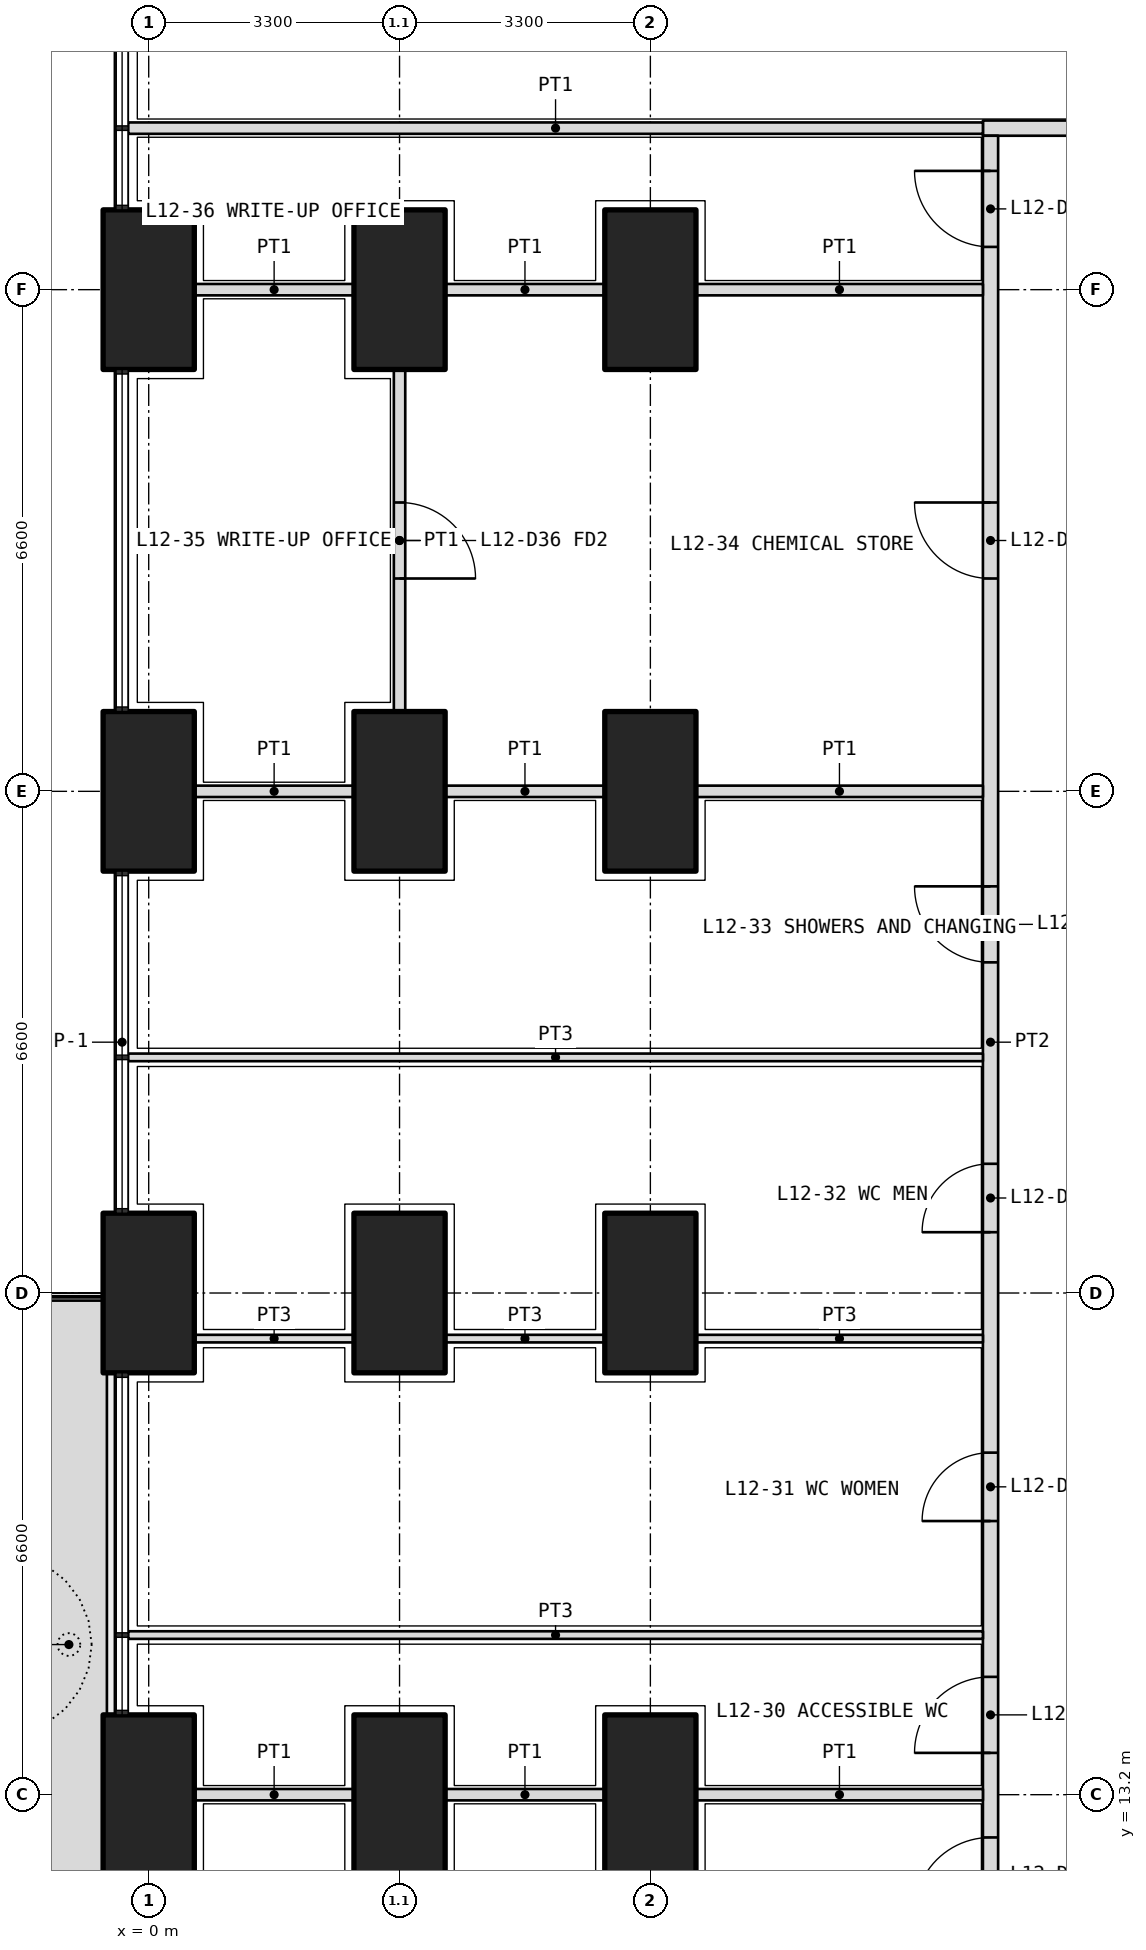
"""IFC4 building model, lengths in metres.
Left out: names, types, materials, properties, quantities, classifications, styles, units other than length and angle.
Written with IfcOpenShell. Run it as: python <this file> out.ifc"""

import sys

from ifc_helpers import new_model, si_unit, direction, frame, frame_2d, origin, origin_2d, place, context, subcontext, project, spatial, polyline, rectangle, outline, extrude, element, fill, save


model = new_model("IFC4")
c1 = context("Model", 3, precision=1e-05, world=origin(), true_north=direction((0.0, 1.0)))
c2 = subcontext(c1, "Body", "Model", "MODEL_VIEW")
j1 = project(units=[si_unit("LENGTHUNIT", "METRE"), si_unit("PLANEANGLEUNIT", "RADIAN")], contexts=[c1])
p1 = place(None, origin())
s1 = spatial("IfcSite", under=j1, at=p1, CompositionType="ELEMENT")
p2 = place(p1, origin())
s2 = spatial("IfcBuilding", under=s1, at=p2, CompositionType="ELEMENT")
p3 = place(p2, frame((0.0, 0.0, 54.9)))
s3 = spatial("IfcBuildingStorey", under=s2, at=p3, CompositionType="ELEMENT", Elevation=54.9)
for number, where, z_axis, x_axis in (
    (1, (0.0, 13.2, 0.0), (0.0, 0.0, 1.0), (0.0, 1.0, 0.0)),
    (2, (0.0, 19.8, 0.0), (0.0, 0.0, 1.0), (0.0, 1.0, 0.0)),
    (3, (0.0, 26.4, 0.0), (0.0, 0.0, 1.0), (0.0, 1.0, 0.0)),
    (4, (0.0, 33.0, 0.0), (0.0, 0.0, 1.0), (0.0, 1.0, 0.0)),
    (5, (3.3, 13.2, 0.0), (0.0, 0.0, 1.0), (0.0, 1.0, 0.0)),
    (6, (3.3, 19.8, 0.0), (0.0, 0.0, 1.0), (0.0, 1.0, 0.0)),
    (7, (3.3, 26.4, 0.0), (0.0, 0.0, 1.0), (0.0, 1.0, 0.0)),
    (8, (3.3, 33.0, 0.0), (0.0, 0.0, 1.0), (0.0, 1.0, 0.0)),
    (9, (6.6, 13.2, 0.0), (0.0, 0.0, 1.0), (0.0, 1.0, 0.0)),
    (10, (6.6, 19.8, 0.0), (0.0, 0.0, 1.0), (0.0, 1.0, 0.0)),
    (11, (6.6, 26.4, 0.0), (0.0, 0.0, 1.0), (0.0, 1.0, 0.0)),
    (12, (6.6, 33.0, 0.0), (0.0, 0.0, 1.0), (0.0, 1.0, 0.0)),
):
    element("IfcColumn", number, at=place(p3, frame(where, z_axis=z_axis, x_axis=x_axis)), inside=s3, PredefinedType="COLUMN", context=c2, shape_type="SweptSolid", body=[
        extrude(rectangle(XDim=2.1, YDim=1.2, at=origin_2d()), origin(), (0.0, 0.0, 1.0), 4.2),
    ])
p4 = place(p3, origin())
e13 = element("IfcWall", 13, at=p4, inside=s3, PredefinedType="USERDEFINED", context=c2, shape_type="SweptSolid", body=[
    extrude(outline(polyline([(-1.55, 10.65), (-0.55, 10.65), (-0.55, 19.7), (-1.55, 19.7), (-1.55, 10.65)]), holes=[polyline([(-1.4, 10.8), (-0.7, 10.8), (-0.7, 19.55), (-1.4, 19.55), (-1.4, 10.8)])]), origin(), (0.0, 0.0, 1.0), 1.05),
])
p5 = place(p3, frame((10.975, 35.125, 0.0), z_axis=(0.0, 0.0, 1.0), x_axis=(1.0, 0.0, 0.0)))
e14 = element("IfcWall", 14, at=p5, inside=s3, PredefinedType="PARTITIONING", context=c2, shape_type="SweptSolid", body=[
    extrude(rectangle(XDim=30.85, YDim=0.2, at=frame_2d((15.425, 0.0))), origin(), (0.0, 0.0, 1.0), 2.85),
])
p6 = place(p5, frame((2.312, 0.0, 0.0)))
e15 = element("IfcOpeningElement", 15, at=p6, cuts=e14, PredefinedType="OPENING", context=c2, shape_type="SweptSolid", body=[
    extrude(rectangle(XDim=1.0, YDim=2.1, at=frame_2d((0.5, 1.05))), frame((0.0, 0.11, 0.0), z_axis=(0.0, -1.0, 0.0), x_axis=(1.0, 0.0, 0.0)), (0.0, 0.0, 1.0), 0.22),
])
p7 = place(p5, frame((11.625, 0.0, 0.0)))
e16 = element("IfcOpeningElement", 16, at=p7, cuts=e14, PredefinedType="OPENING", context=c2, shape_type="SweptSolid", body=[
    extrude(rectangle(XDim=1.0, YDim=2.1, at=frame_2d((0.5, 1.05))), frame((0.0, 0.11, 0.0), z_axis=(0.0, -1.0, 0.0), x_axis=(1.0, 0.0, 0.0)), (0.0, 0.0, 1.0), 0.22),
])
p8 = place(p5, frame((21.525, 0.0, 0.0)))
e17 = element("IfcOpeningElement", 17, at=p8, cuts=e14, PredefinedType="OPENING", context=c2, shape_type="SweptSolid", body=[
    extrude(rectangle(XDim=1.0, YDim=2.1, at=frame_2d((0.5, 1.05))), frame((0.0, 0.11, 0.0), z_axis=(0.0, -1.0, 0.0), x_axis=(1.0, 0.0, 0.0)), (0.0, 0.0, 1.0), 0.22),
])
p9 = place(p5, frame((26.475, 0.0, 0.0)))
e18 = element("IfcOpeningElement", 18, at=p9, cuts=e14, PredefinedType="OPENING", context=c2, shape_type="SweptSolid", body=[
    extrude(rectangle(XDim=1.0, YDim=2.1, at=frame_2d((0.5, 1.05))), frame((0.0, 0.11, 0.0), z_axis=(0.0, -1.0, 0.0), x_axis=(1.0, 0.0, 0.0)), (0.0, 0.0, 1.0), 0.22),
])
p10 = place(p5, frame((29.188, 0.0, 0.0)))
e19 = element("IfcOpeningElement", 19, at=p10, cuts=e14, PredefinedType="OPENING", context=c2, shape_type="SweptSolid", body=[
    extrude(rectangle(XDim=1.0, YDim=2.1, at=frame_2d((0.5, 1.05))), frame((0.0, 0.11, 0.0), z_axis=(0.0, -1.0, 0.0), x_axis=(1.0, 0.0, 0.0)), (0.0, 0.0, 1.0), 0.22),
])
p11 = place(p3, frame((11.075, 11.175, 0.0), z_axis=(0.0, 0.0, 1.0), x_axis=(0.0, 1.0, 0.0)))
e20 = element("IfcWall", 20, at=p11, inside=s3, PredefinedType="PARTITIONING", context=c2, shape_type="SweptSolid", body=[
    extrude(rectangle(XDim=23.85, YDim=0.2, at=frame_2d((11.925, 0.0))), origin(), (0.0, 0.0, 1.0), 2.85),
])
p12 = place(p11, frame((0.462, 0.0, 0.0)))
e21 = element("IfcOpeningElement", 21, at=p12, cuts=e20, PredefinedType="OPENING", context=c2, shape_type="SweptSolid", body=[
    extrude(rectangle(XDim=1.0, YDim=2.1, at=frame_2d((0.5, 1.05))), frame((0.0, 0.11, 0.0), z_axis=(0.0, -1.0, 0.0), x_axis=(1.0, 0.0, 0.0)), (0.0, 0.0, 1.0), 0.22),
])
p13 = place(p11, frame((2.575, 0.0, 0.0)))
e22 = element("IfcOpeningElement", 22, at=p13, cuts=e20, PredefinedType="OPENING", context=c2, shape_type="SweptSolid", body=[
    extrude(rectangle(XDim=1.0, YDim=2.1, at=frame_2d((0.5, 1.05))), frame((0.0, 0.11, 0.0), z_axis=(0.0, -1.0, 0.0), x_axis=(1.0, 0.0, 0.0)), (0.0, 0.0, 1.0), 0.22),
])
p14 = place(p11, frame((5.625, 0.0, 0.0)))
e23 = element("IfcOpeningElement", 23, at=p14, cuts=e20, PredefinedType="OPENING", context=c2, shape_type="SweptSolid", body=[
    extrude(rectangle(XDim=0.9, YDim=2.1, at=frame_2d((0.45, 1.05))), frame((0.0, 0.11, 0.0), z_axis=(0.0, -1.0, 0.0), x_axis=(1.0, 0.0, 0.0)), (0.0, 0.0, 1.0), 0.22),
])
p15 = place(p11, frame((9.425, 0.0, 0.0)))
e24 = element("IfcOpeningElement", 24, at=p15, cuts=e20, PredefinedType="OPENING", context=c2, shape_type="SweptSolid", body=[
    extrude(rectangle(XDim=0.9, YDim=2.1, at=frame_2d((0.45, 1.05))), frame((0.0, 0.11, 0.0), z_axis=(0.0, -1.0, 0.0), x_axis=(1.0, 0.0, 0.0)), (0.0, 0.0, 1.0), 0.22),
])
p16 = place(p11, frame((12.975, 0.0, 0.0)))
e25 = element("IfcOpeningElement", 25, at=p16, cuts=e20, PredefinedType="OPENING", context=c2, shape_type="SweptSolid", body=[
    extrude(rectangle(XDim=1.0, YDim=2.1, at=frame_2d((0.5, 1.05))), frame((0.0, 0.11, 0.0), z_axis=(0.0, -1.0, 0.0), x_axis=(1.0, 0.0, 0.0)), (0.0, 0.0, 1.0), 0.22),
])
p17 = place(p11, frame((18.025, 0.0, 0.0)))
e26 = element("IfcOpeningElement", 26, at=p17, cuts=e20, PredefinedType="OPENING", context=c2, shape_type="SweptSolid", body=[
    extrude(rectangle(XDim=1.0, YDim=2.1, at=frame_2d((0.5, 1.05))), frame((0.0, 0.11, 0.0), z_axis=(0.0, -1.0, 0.0), x_axis=(1.0, 0.0, 0.0)), (0.0, 0.0, 1.0), 0.22),
])
p18 = place(p11, frame((22.387, 0.0, 0.0)))
e27 = element("IfcOpeningElement", 27, at=p18, cuts=e20, PredefinedType="OPENING", context=c2, shape_type="SweptSolid", body=[
    extrude(rectangle(XDim=1.0, YDim=2.1, at=frame_2d((0.5, 1.05))), frame((0.0, 0.11, 0.0), z_axis=(0.0, -1.0, 0.0), x_axis=(1.0, 0.0, 0.0)), (0.0, 0.0, 1.0), 0.22),
])
p19 = place(p3, frame((-0.27, 35.125, 0.0), z_axis=(0.0, 0.0, 1.0), x_axis=(1.0, 0.0, 0.0)))
e28 = element("IfcWall", 28, at=p19, inside=s3, PredefinedType="PARTITIONING", context=c2, shape_type="SweptSolid", body=[
    extrude(rectangle(XDim=11.245, YDim=0.15, at=frame_2d((5.623, 0.0))), origin(), (0.0, 0.0, 1.0), 2.7),
])
p20 = place(p3, frame((3.3, 31.95, 0.0), z_axis=(0.0, 0.0, 1.0), x_axis=(0.0, -1.0, 0.0)))
e29 = element("IfcWall", 29, at=p20, inside=s3, PredefinedType="PARTITIONING", context=c2, shape_type="SweptSolid", body=[
    extrude(rectangle(XDim=4.5, YDim=0.15, at=frame_2d((2.25, 0.0))), origin(), (0.0, 0.0, 1.0), 3.9),
])
p21 = place(p20, frame((1.75, 0.0, 0.0)))
e30 = element("IfcOpeningElement", 30, at=p21, cuts=e29, PredefinedType="OPENING", context=c2, shape_type="SweptSolid", body=[
    extrude(rectangle(XDim=1.0, YDim=2.1, at=frame_2d((0.5, 1.05))), frame((0.0, 0.085, 0.0), z_axis=(0.0, -1.0, 0.0), x_axis=(1.0, 0.0, 0.0)), (0.0, 0.0, 1.0), 0.17),
])
p22 = place(p3, frame((-0.27, 15.3, 0.0), z_axis=(0.0, 0.0, 1.0), x_axis=(1.0, 0.0, 0.0)))
e31 = element("IfcWall", 31, at=p22, inside=s3, PredefinedType="PARTITIONING", context=c2, shape_type="SweptSolid", body=[
    extrude(rectangle(XDim=11.245, YDim=0.1, at=frame_2d((5.623, 0.0))), origin(), (0.0, 0.0, 1.0), 2.7),
])
p23 = place(p3, frame((0.6, 19.2, 0.0), z_axis=(0.0, 0.0, 1.0), x_axis=(1.0, 0.0, 0.0)))
e32 = element("IfcWall", 32, at=p23, inside=s3, PredefinedType="PARTITIONING", context=c2, shape_type="SweptSolid", body=[
    extrude(rectangle(XDim=2.1, YDim=0.1, at=frame_2d((1.05, 0.0))), origin(), (0.0, 0.0, 1.0), 2.85),
])
p24 = place(p3, frame((3.9, 19.2, 0.0), z_axis=(0.0, 0.0, 1.0), x_axis=(1.0, 0.0, 0.0)))
e33 = element("IfcWall", 33, at=p24, inside=s3, PredefinedType="PARTITIONING", context=c2, shape_type="SweptSolid", body=[
    extrude(rectangle(XDim=2.1, YDim=0.1, at=frame_2d((1.05, 0.0))), origin(), (0.0, 0.0, 1.0), 2.85),
])
p25 = place(p3, frame((7.2, 19.2, 0.0), z_axis=(0.0, 0.0, 1.0), x_axis=(1.0, 0.0, 0.0)))
e34 = element("IfcWall", 34, at=p25, inside=s3, PredefinedType="PARTITIONING", context=c2, shape_type="SweptSolid", body=[
    extrude(rectangle(XDim=3.775, YDim=0.1, at=frame_2d((1.888, 0.0))), origin(), (0.0, 0.0, 1.0), 2.85),
])
p26 = place(p3, frame((-0.27, 22.9, 0.0), z_axis=(0.0, 0.0, 1.0), x_axis=(1.0, 0.0, 0.0)))
e35 = element("IfcWall", 35, at=p26, inside=s3, PredefinedType="PARTITIONING", context=c2, shape_type="SweptSolid", body=[
    extrude(rectangle(XDim=11.245, YDim=0.1, at=frame_2d((5.623, 0.0))), origin(), (0.0, 0.0, 1.0), 2.7),
])
p27 = place(p3, frame((0.6, 13.2, 0.0), z_axis=(0.0, 0.0, 1.0), x_axis=(1.0, 0.0, 0.0)))
e36 = element("IfcWall", 36, at=p27, inside=s3, PredefinedType="PARTITIONING", context=c2, shape_type="SweptSolid", body=[
    extrude(rectangle(XDim=2.1, YDim=0.15, at=frame_2d((1.05, 0.0))), origin(), (0.0, 0.0, 1.0), 2.85),
])
p28 = place(p3, frame((3.9, 13.2, 0.0), z_axis=(0.0, 0.0, 1.0), x_axis=(1.0, 0.0, 0.0)))
e37 = element("IfcWall", 37, at=p28, inside=s3, PredefinedType="PARTITIONING", context=c2, shape_type="SweptSolid", body=[
    extrude(rectangle(XDim=2.1, YDim=0.15, at=frame_2d((1.05, 0.0))), origin(), (0.0, 0.0, 1.0), 2.85),
])
p29 = place(p3, frame((7.2, 13.2, 0.0), z_axis=(0.0, 0.0, 1.0), x_axis=(1.0, 0.0, 0.0)))
e38 = element("IfcWall", 38, at=p29, inside=s3, PredefinedType="PARTITIONING", context=c2, shape_type="SweptSolid", body=[
    extrude(rectangle(XDim=3.775, YDim=0.15, at=frame_2d((1.888, 0.0))), origin(), (0.0, 0.0, 1.0), 2.85),
])
p30 = place(p3, frame((0.6, 26.4, 0.0), z_axis=(0.0, 0.0, 1.0), x_axis=(1.0, 0.0, 0.0)))
e39 = element("IfcWall", 39, at=p30, inside=s3, PredefinedType="PARTITIONING", context=c2, shape_type="SweptSolid", body=[
    extrude(rectangle(XDim=2.1, YDim=0.15, at=frame_2d((1.05, 0.0))), origin(), (0.0, 0.0, 1.0), 2.85),
])
p31 = place(p3, frame((3.9, 26.4, 0.0), z_axis=(0.0, 0.0, 1.0), x_axis=(1.0, 0.0, 0.0)))
e40 = element("IfcWall", 40, at=p31, inside=s3, PredefinedType="PARTITIONING", context=c2, shape_type="SweptSolid", body=[
    extrude(rectangle(XDim=2.1, YDim=0.15, at=frame_2d((1.05, 0.0))), origin(), (0.0, 0.0, 1.0), 2.85),
])
p32 = place(p3, frame((7.2, 26.4, 0.0), z_axis=(0.0, 0.0, 1.0), x_axis=(1.0, 0.0, 0.0)))
e41 = element("IfcWall", 41, at=p32, inside=s3, PredefinedType="PARTITIONING", context=c2, shape_type="SweptSolid", body=[
    extrude(rectangle(XDim=3.775, YDim=0.15, at=frame_2d((1.888, 0.0))), origin(), (0.0, 0.0, 1.0), 2.85),
])
p33 = place(p3, frame((0.6, 33.0, 0.0), z_axis=(0.0, 0.0, 1.0), x_axis=(1.0, 0.0, 0.0)))
e42 = element("IfcWall", 42, at=p33, inside=s3, PredefinedType="PARTITIONING", context=c2, shape_type="SweptSolid", body=[
    extrude(rectangle(XDim=2.1, YDim=0.15, at=frame_2d((1.05, 0.0))), origin(), (0.0, 0.0, 1.0), 2.85),
])
p34 = place(p3, frame((3.9, 33.0, 0.0), z_axis=(0.0, 0.0, 1.0), x_axis=(1.0, 0.0, 0.0)))
e43 = element("IfcWall", 43, at=p34, inside=s3, PredefinedType="PARTITIONING", context=c2, shape_type="SweptSolid", body=[
    extrude(rectangle(XDim=2.1, YDim=0.15, at=frame_2d((1.05, 0.0))), origin(), (0.0, 0.0, 1.0), 2.85),
])
p35 = place(p3, frame((7.2, 33.0, 0.0), z_axis=(0.0, 0.0, 1.0), x_axis=(1.0, 0.0, 0.0)))
e44 = element("IfcWall", 44, at=p35, inside=s3, PredefinedType="PARTITIONING", context=c2, shape_type="SweptSolid", body=[
    extrude(rectangle(XDim=3.775, YDim=0.15, at=frame_2d((1.888, 0.0))), origin(), (0.0, 0.0, 1.0), 2.85),
])
p36 = place(p12, origin())
e45 = element("IfcDoor", 45, at=p36, inside=s3, OperationType="SINGLE_SWING_LEFT", PredefinedType="DOOR", context=c2, shape_type="SweptSolid", body=[
    extrude(rectangle(XDim=1.0, YDim=2.1, at=frame_2d((0.5, 1.05))), frame((0.0, 0.025, 0.0), z_axis=(0.0, -1.0, 0.0), x_axis=(1.0, 0.0, 0.0)), (0.0, 0.0, 1.0), 0.05),
])
fill(e21, e45)
p37 = place(p13, origin())
e46 = element("IfcDoor", 46, at=p37, inside=s3, OperationType="SINGLE_SWING_LEFT", PredefinedType="DOOR", context=c2, shape_type="SweptSolid", body=[
    extrude(rectangle(XDim=1.0, YDim=2.1, at=frame_2d((0.5, 1.05))), frame((0.0, 0.025, 0.0), z_axis=(0.0, -1.0, 0.0), x_axis=(1.0, 0.0, 0.0)), (0.0, 0.0, 1.0), 0.05),
])
fill(e22, e46)
p38 = place(p14, origin())
e47 = element("IfcDoor", 47, at=p38, inside=s3, OperationType="SINGLE_SWING_LEFT", PredefinedType="DOOR", context=c2, shape_type="SweptSolid", body=[
    extrude(rectangle(XDim=0.9, YDim=2.1, at=frame_2d((0.45, 1.05))), frame((0.0, 0.025, 0.0), z_axis=(0.0, -1.0, 0.0), x_axis=(1.0, 0.0, 0.0)), (0.0, 0.0, 1.0), 0.05),
])
fill(e23, e47)
p39 = place(p15, origin())
e48 = element("IfcDoor", 48, at=p39, inside=s3, OperationType="SINGLE_SWING_LEFT", PredefinedType="DOOR", context=c2, shape_type="SweptSolid", body=[
    extrude(rectangle(XDim=0.9, YDim=2.1, at=frame_2d((0.45, 1.05))), frame((0.0, 0.025, 0.0), z_axis=(0.0, -1.0, 0.0), x_axis=(1.0, 0.0, 0.0)), (0.0, 0.0, 1.0), 0.05),
])
fill(e24, e48)
p40 = place(p16, origin())
e49 = element("IfcDoor", 49, at=p40, inside=s3, OperationType="SINGLE_SWING_RIGHT", PredefinedType="DOOR", context=c2, shape_type="SweptSolid", body=[
    extrude(rectangle(XDim=1.0, YDim=2.1, at=frame_2d((0.5, 1.05))), frame((0.0, 0.025, 0.0), z_axis=(0.0, -1.0, 0.0), x_axis=(1.0, 0.0, 0.0)), (0.0, 0.0, 1.0), 0.05),
])
fill(e25, e49)
p41 = place(p17, origin())
e50 = element("IfcDoor", 50, at=p41, inside=s3, OperationType="SINGLE_SWING_RIGHT", PredefinedType="DOOR", context=c2, shape_type="SweptSolid", body=[
    extrude(rectangle(XDim=1.0, YDim=2.1, at=frame_2d((0.5, 1.05))), frame((0.0, 0.025, 0.0), z_axis=(0.0, -1.0, 0.0), x_axis=(1.0, 0.0, 0.0)), (0.0, 0.0, 1.0), 0.05),
])
fill(e26, e50)
p42 = place(p21, origin())
e51 = element("IfcDoor", 51, at=p42, inside=s3, OperationType="SINGLE_SWING_RIGHT", PredefinedType="DOOR", context=c2, shape_type="SweptSolid", body=[
    extrude(rectangle(XDim=1.0, YDim=2.1, at=frame_2d((0.5, 1.05))), frame((0.0, 0.025, 0.0), z_axis=(0.0, -1.0, 0.0), x_axis=(1.0, 0.0, 0.0)), (0.0, 0.0, 1.0), 0.05),
])
fill(e30, e51)
p43 = place(p18, origin())
e52 = element("IfcDoor", 52, at=p43, inside=s3, OperationType="SINGLE_SWING_RIGHT", PredefinedType="DOOR", context=c2, shape_type="SweptSolid", body=[
    extrude(rectangle(XDim=1.0, YDim=2.1, at=frame_2d((0.5, 1.05))), frame((0.0, 0.025, 0.0), z_axis=(0.0, -1.0, 0.0), x_axis=(1.0, 0.0, 0.0)), (0.0, 0.0, 1.0), 0.05),
])
fill(e27, e52)
save(model, sys.argv[1])
